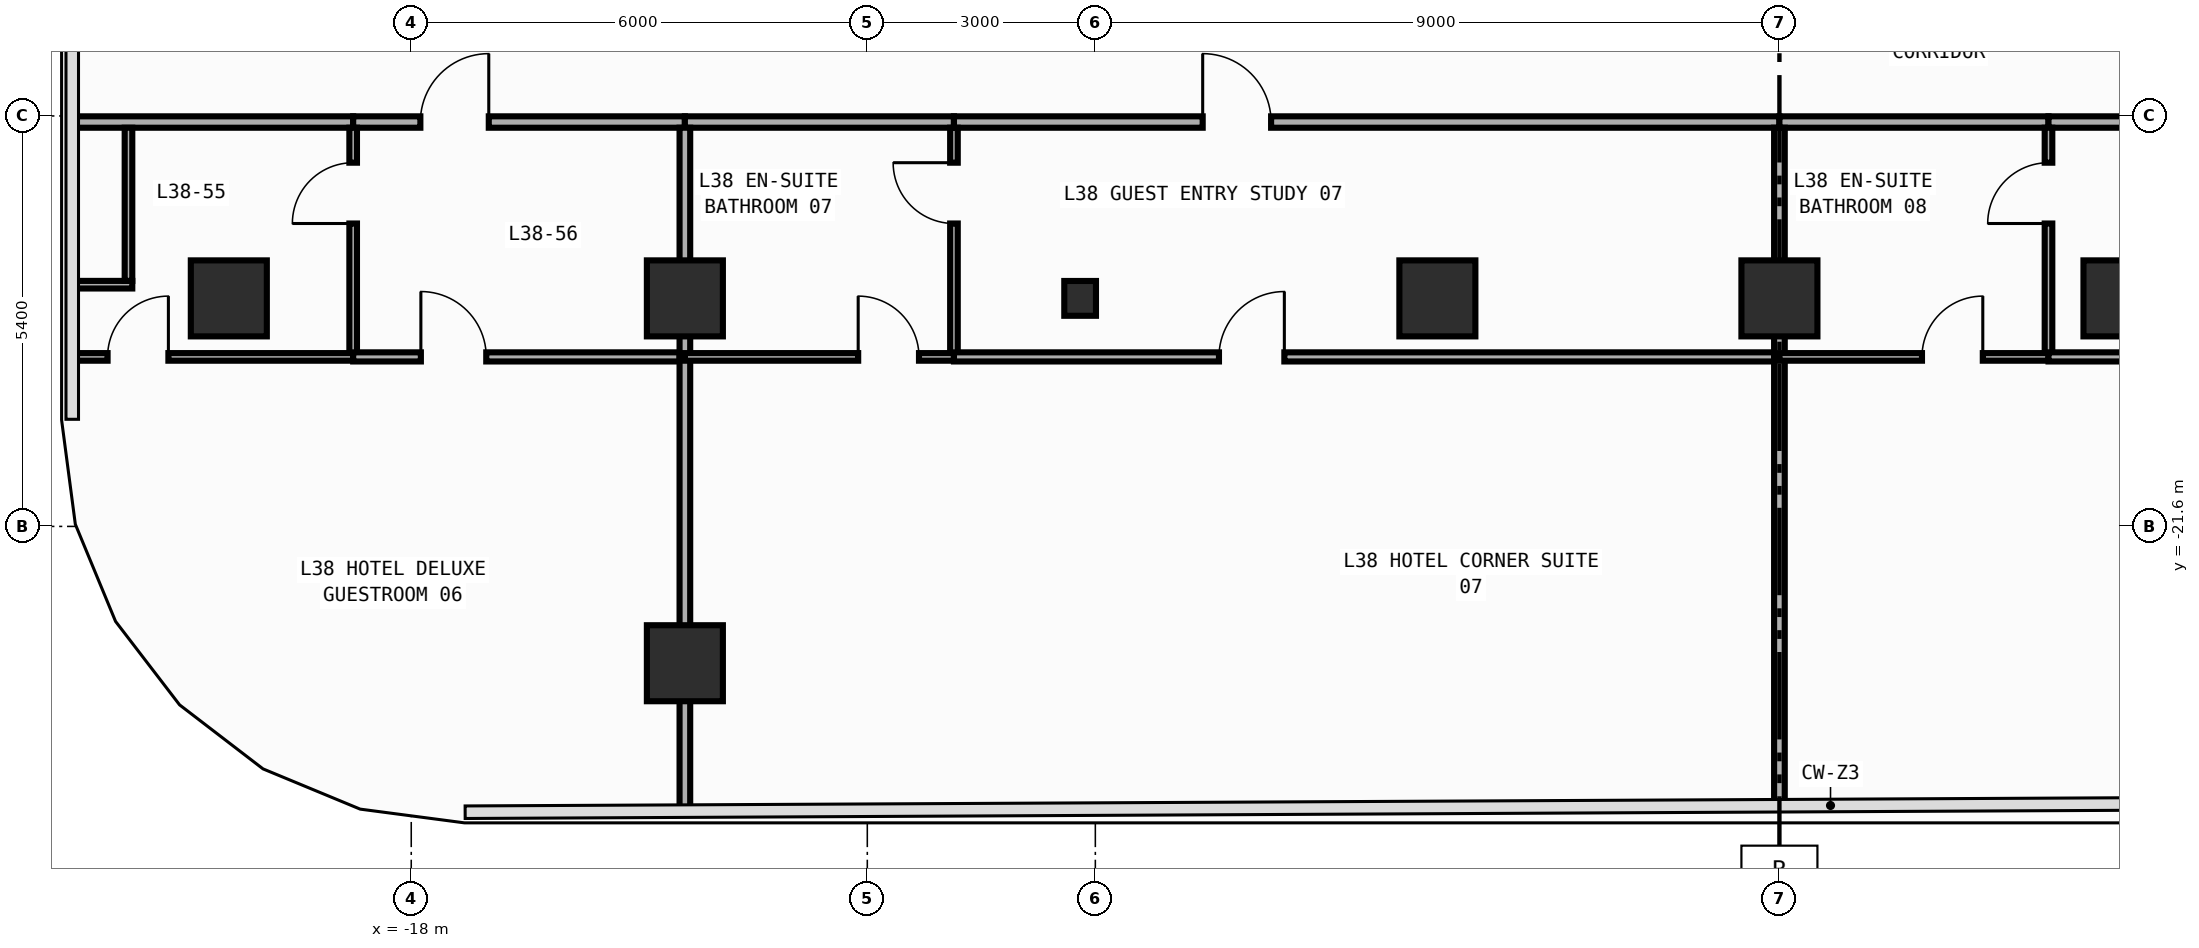
"""IFC4 building model, lengths in metres.
Left out: names, types, materials, properties, quantities, classifications, styles, units other than length and angle.
Written with IfcOpenShell. Run it as: python <this file> out.ifc"""

import sys

from ifc_helpers import new_model, si_unit, direction, frame, frame_2d, origin, origin_2d, place, context, subcontext, project, spatial, rectangle, i_section, extrude, element, fill, save


model = new_model("IFC4")
c1 = context("Model", 3, precision=1e-05, world=origin(), true_north=direction((0.0, 1.0)))
c2 = subcontext(c1, "Body", "Model", "MODEL_VIEW")
j1 = project(units=[si_unit("LENGTHUNIT", "METRE"), si_unit("PLANEANGLEUNIT", "RADIAN")], contexts=[c1])
p1 = place(None, origin())
s1 = spatial("IfcSite", under=j1, at=p1, CompositionType="ELEMENT")
p2 = place(p1, origin())
s2 = spatial("IfcBuilding", under=s1, at=p2, CompositionType="ELEMENT")
p3 = place(p2, frame((0.0, 0.0, 168.8)))
s3 = spatial("IfcBuildingStorey", under=s2, at=p3, CompositionType="ELEMENT", Elevation=168.8)
p4 = place(p3, frame((-9.2, -18.6, 0.0), z_axis=(0.0, 0.0, 1.0), x_axis=(1.0, 0.0, 0.0)))
e1 = element("IfcColumn", 1, at=p4, inside=s3, PredefinedType="COLUMN", context=c2, shape_type="SweptSolid", body=[
    extrude(i_section(OverallWidth=0.417, OverallDepth=0.458, WebThickness=0.03, FlangeThickness=0.05, FilletRadius=0.022, at=origin_2d()), origin(), (0.0, 0.0, 1.0), 3.8),
])
for number, where, z_axis, x_axis in (
    (2, (-20.4, -18.6, 0.0), (0.0, 0.0, 1.0), (1.0, 0.0, 0.0)),
    (3, (-14.4, -18.6, 0.0), (0.0, 0.0, 1.0), (1.0, 0.0, 0.0)),
    (4, (-4.5, -18.6, 0.0), (0.0, 0.0, 1.0), (1.0, 0.0, 0.0)),
    (5, (0.0, -18.6, 0.0), (0.0, 0.0, 1.0), (1.0, 0.0, 0.0)),
    (6, (4.5, -18.6, 0.0), (0.0, 0.0, 1.0), (1.0, 0.0, 0.0)),
    (7, (-14.4, -23.4, 0.0), (0.0, 0.0, 1.0), (1.0, 0.0, 0.0)),
):
    element("IfcColumn", number, at=place(p3, frame(where, z_axis=z_axis, x_axis=x_axis)), inside=s3, PredefinedType="COLUMN", context=c2, shape_type="SweptSolid", body=[
        extrude(rectangle(XDim=1.0, YDim=1.0, at=origin_2d()), origin(), (0.0, 0.0, 1.0), 3.8),
    ])
p5 = place(p3, frame((-22.455, -16.28, 0.0), z_axis=(0.0, 0.0, 1.0), x_axis=(1.0, 0.0, 0.0)))
e8 = element("IfcWall", 8, at=p5, inside=s3, PredefinedType="PARTITIONING", context=c2, shape_type="SweptSolid", body=[
    extrude(rectangle(XDim=3.691, YDim=0.15, at=frame_2d((1.846, 0.0))), origin(), (0.0, 0.0, 1.0), 3.54),
])
p6 = place(p3, frame((-18.764, -16.28, 0.0), z_axis=(0.0, 0.0, 1.0), x_axis=(1.0, 0.0, 0.0)))
e9 = element("IfcWall", 9, at=p6, inside=s3, PredefinedType="PARTITIONING", context=c2, shape_type="SweptSolid", body=[
    extrude(rectangle(XDim=4.364, YDim=0.15, at=frame_2d((2.182, 0.0))), origin(), (0.0, 0.0, 1.0), 3.54),
])
p7 = place(p6, frame((0.884, 0.0, 0.0)))
e10 = element("IfcOpeningElement", 10, at=p7, cuts=e9, PredefinedType="OPENING", context=c2, shape_type="SweptSolid", body=[
    extrude(rectangle(XDim=0.9, YDim=2.15, at=frame_2d((0.45, 1.075))), frame((0.0, 0.085, 0.0), z_axis=(0.0, -1.0, 0.0), x_axis=(1.0, 0.0, 0.0)), (0.0, 0.0, 1.0), 0.17),
])
p8 = place(p3, frame((-14.4, -16.28, 0.0), z_axis=(0.0, 0.0, 1.0), x_axis=(1.0, 0.0, 0.0)))
e11 = element("IfcWall", 11, at=p8, inside=s3, PredefinedType="PARTITIONING", context=c2, shape_type="SweptSolid", body=[
    extrude(rectangle(XDim=3.54, YDim=0.15, at=frame_2d((1.77, 0.0))), origin(), (0.0, 0.0, 1.0), 3.54),
])
p9 = place(p3, frame((-10.86, -16.28, 0.0), z_axis=(0.0, 0.0, 1.0), x_axis=(1.0, 0.0, 0.0)))
e12 = element("IfcWall", 12, at=p9, inside=s3, PredefinedType="PARTITIONING", context=c2, shape_type="SweptSolid", body=[
    extrude(rectangle(XDim=10.86, YDim=0.15, at=frame_2d((5.43, 0.0))), origin(), (0.0, 0.0, 1.0), 3.54),
])
p10 = place(p9, frame((3.272, 0.0, 0.0)))
e13 = element("IfcOpeningElement", 13, at=p10, cuts=e12, PredefinedType="OPENING", context=c2, shape_type="SweptSolid", body=[
    extrude(rectangle(XDim=0.9, YDim=2.15, at=frame_2d((0.45, 1.075))), frame((0.0, 0.085, 0.0), z_axis=(0.0, -1.0, 0.0), x_axis=(1.0, 0.0, 0.0)), (0.0, 0.0, 1.0), 0.17),
])
p11 = place(p3, frame((0.0, -16.28, 0.0), z_axis=(0.0, 0.0, 1.0), x_axis=(1.0, 0.0, 0.0)))
e14 = element("IfcWall", 14, at=p11, inside=s3, PredefinedType="PARTITIONING", context=c2, shape_type="SweptSolid", body=[
    extrude(rectangle(XDim=3.54, YDim=0.15, at=frame_2d((1.77, 0.0))), origin(), (0.0, 0.0, 1.0), 3.54),
])
p12 = place(p3, frame((3.54, -16.28, 0.0), z_axis=(0.0, 0.0, 1.0), x_axis=(1.0, 0.0, 0.0)))
e15 = element("IfcWall", 15, at=p12, inside=s3, PredefinedType="PARTITIONING", context=c2, shape_type="SweptSolid", body=[
    extrude(rectangle(XDim=8.7, YDim=0.15, at=frame_2d((4.35, 0.0))), origin(), (0.0, 0.0, 1.0), 3.54),
])
p13 = place(p12, frame((7.34, 0.0, 0.0)))
e16 = element("IfcOpeningElement", 16, at=p13, cuts=e15, PredefinedType="OPENING", context=c2, shape_type="SweptSolid", body=[
    extrude(rectangle(XDim=0.9, YDim=2.15, at=frame_2d((0.45, 1.075))), frame((0.0, 0.085, 0.0), z_axis=(0.0, -1.0, 0.0), x_axis=(1.0, 0.0, 0.0)), (0.0, 0.0, 1.0), 0.17),
])
p14 = place(p3, frame((-18.764, -19.32, 0.0), z_axis=(0.0, 0.0, 1.0), x_axis=(0.0, 1.0, 0.0)))
e17 = element("IfcWall", 17, at=p14, inside=s3, PredefinedType="PARTITIONING", context=c2, shape_type="SweptSolid", body=[
    extrude(rectangle(XDim=2.965, YDim=0.1, at=frame_2d((1.482, 0.0))), origin(), (0.0, 0.0, 1.0), 3.54),
])
p15 = place(p14, frame((1.705, 0.0, 0.0)))
e18 = element("IfcOpeningElement", 18, at=p15, cuts=e17, PredefinedType="OPENING", context=c2, shape_type="SweptSolid", body=[
    extrude(rectangle(XDim=0.8, YDim=2.1, at=frame_2d((0.4, 1.05))), frame((0.0, 0.06, 0.0), z_axis=(0.0, -1.0, 0.0), x_axis=(1.0, 0.0, 0.0)), (0.0, 0.0, 1.0), 0.12),
])
p16 = place(p3, frame((-22.455, -19.37, 0.0), z_axis=(0.0, 0.0, 1.0), x_axis=(1.0, 0.0, 0.0)))
e19 = element("IfcWall", 19, at=p16, inside=s3, PredefinedType="PARTITIONING", context=c2, shape_type="SweptSolid", body=[
    extrude(rectangle(XDim=3.691, YDim=0.1, at=frame_2d((1.846, 0.0))), origin(), (0.0, 0.0, 1.0), 3.54),
])
p17 = place(p16, frame((0.46, 0.0, 0.0)))
e20 = element("IfcOpeningElement", 20, at=p17, cuts=e19, PredefinedType="OPENING", context=c2, shape_type="SweptSolid", body=[
    extrude(rectangle(XDim=0.8, YDim=2.1, at=frame_2d((0.4, 1.05))), frame((0.0, 0.06, 0.0), z_axis=(0.0, -1.0, 0.0), x_axis=(1.0, 0.0, 0.0)), (0.0, 0.0, 1.0), 0.12),
])
p18 = place(p3, frame((-18.764, -19.37, 0.0), z_axis=(0.0, 0.0, 1.0), x_axis=(1.0, 0.0, 0.0)))
e21 = element("IfcWall", 21, at=p18, inside=s3, PredefinedType="PARTITIONING", context=c2, shape_type="SweptSolid", body=[
    extrude(rectangle(XDim=4.364, YDim=0.12, at=frame_2d((2.182, 0.0))), origin(), (0.0, 0.0, 1.0), 3.54),
])
p19 = place(p18, frame((0.891, 0.0, 0.0)))
e22 = element("IfcOpeningElement", 22, at=p19, cuts=e21, PredefinedType="OPENING", context=c2, shape_type="SweptSolid", body=[
    extrude(rectangle(XDim=0.86, YDim=2.15, at=frame_2d((0.43, 1.075))), frame((0.0, 0.07, 0.0), z_axis=(0.0, -1.0, 0.0), x_axis=(1.0, 0.0, 0.0)), (0.0, 0.0, 1.0), 0.14),
])
p20 = place(p3, frame((-14.4, -19.37, 0.0), z_axis=(0.0, 0.0, 1.0), x_axis=(0.0, 1.0, 0.0)))
e23 = element("IfcWall", 23, at=p20, inside=s3, PredefinedType="PARTITIONING", context=c2, shape_type="SweptSolid", body=[
    extrude(rectangle(XDim=3.015, YDim=0.14, at=frame_2d((1.508, 0.0))), origin(), (0.0, 0.0, 1.0), 2.952),
])
p21 = place(p3, frame((-14.4, -25.341, 0.0), z_axis=(0.0, 0.0, 1.0), x_axis=(0.0, 1.0, 0.0)))
e24 = element("IfcWall", 24, at=p21, inside=s3, PredefinedType="PARTITIONING", context=c2, shape_type="SweptSolid", body=[
    extrude(rectangle(XDim=5.971, YDim=0.14, at=frame_2d((2.985, 0.0))), origin(), (0.0, 0.0, 1.0), 2.952),
])
p22 = place(p3, frame((-10.86, -19.32, 0.0), z_axis=(0.0, 0.0, 1.0), x_axis=(0.0, 1.0, 0.0)))
e25 = element("IfcWall", 25, at=p22, inside=s3, PredefinedType="PARTITIONING", context=c2, shape_type="SweptSolid", body=[
    extrude(rectangle(XDim=2.965, YDim=0.1, at=frame_2d((1.482, 0.0))), origin(), (0.0, 0.0, 1.0), 3.54),
])
p23 = place(p22, frame((1.705, 0.0, 0.0)))
e26 = element("IfcOpeningElement", 26, at=p23, cuts=e25, PredefinedType="OPENING", context=c2, shape_type="SweptSolid", body=[
    extrude(rectangle(XDim=0.8, YDim=2.1, at=frame_2d((0.4, 1.05))), frame((0.0, 0.06, 0.0), z_axis=(0.0, -1.0, 0.0), x_axis=(1.0, 0.0, 0.0)), (0.0, 0.0, 1.0), 0.12),
])
p24 = place(p3, frame((-14.4, -19.37, 0.0), z_axis=(0.0, 0.0, 1.0), x_axis=(1.0, 0.0, 0.0)))
e27 = element("IfcWall", 27, at=p24, inside=s3, PredefinedType="PARTITIONING", context=c2, shape_type="SweptSolid", body=[
    extrude(rectangle(XDim=3.54, YDim=0.1, at=frame_2d((1.77, 0.0))), origin(), (0.0, 0.0, 1.0), 3.54),
])
p25 = place(p24, frame((2.28, 0.0, 0.0)))
e28 = element("IfcOpeningElement", 28, at=p25, cuts=e27, PredefinedType="OPENING", context=c2, shape_type="SweptSolid", body=[
    extrude(rectangle(XDim=0.8, YDim=2.1, at=frame_2d((0.4, 1.05))), frame((0.0, 0.06, 0.0), z_axis=(0.0, -1.0, 0.0), x_axis=(1.0, 0.0, 0.0)), (0.0, 0.0, 1.0), 0.12),
])
p26 = place(p3, frame((-10.86, -19.37, 0.0), z_axis=(0.0, 0.0, 1.0), x_axis=(1.0, 0.0, 0.0)))
e29 = element("IfcWall", 29, at=p26, inside=s3, PredefinedType="PARTITIONING", context=c2, shape_type="SweptSolid", body=[
    extrude(rectangle(XDim=10.86, YDim=0.12, at=frame_2d((5.43, 0.0))), origin(), (0.0, 0.0, 1.0), 3.54),
])
p27 = place(p26, frame((3.487, 0.0, 0.0)))
e30 = element("IfcOpeningElement", 30, at=p27, cuts=e29, PredefinedType="OPENING", context=c2, shape_type="SweptSolid", body=[
    extrude(rectangle(XDim=0.86, YDim=2.15, at=frame_2d((0.43, 1.075))), frame((0.0, 0.07, 0.0), z_axis=(0.0, -1.0, 0.0), x_axis=(1.0, 0.0, 0.0)), (0.0, 0.0, 1.0), 0.14),
])
p28 = place(p3, frame((0.0, -19.37, 0.0), z_axis=(0.0, 0.0, 1.0), x_axis=(0.0, 1.0, 0.0)))
e31 = element("IfcWall", 31, at=p28, inside=s3, PredefinedType="PARTITIONING", context=c2, shape_type="SweptSolid", body=[
    extrude(rectangle(XDim=3.015, YDim=0.14, at=frame_2d((1.508, 0.0))), origin(), (0.0, 0.0, 1.0), 3.54),
])
p29 = place(p3, frame((0.0, -25.27, 0.0), z_axis=(0.0, 0.0, 1.0), x_axis=(0.0, 1.0, 0.0)))
e32 = element("IfcWall", 32, at=p29, inside=s3, PredefinedType="PARTITIONING", context=c2, shape_type="SweptSolid", body=[
    extrude(rectangle(XDim=5.9, YDim=0.14, at=frame_2d((2.95, 0.0))), origin(), (0.0, 0.0, 1.0), 3.54),
])
p30 = place(p3, frame((3.54, -19.32, 0.0), z_axis=(0.0, 0.0, 1.0), x_axis=(0.0, 1.0, 0.0)))
e33 = element("IfcWall", 33, at=p30, inside=s3, PredefinedType="PARTITIONING", context=c2, shape_type="SweptSolid", body=[
    extrude(rectangle(XDim=2.965, YDim=0.1, at=frame_2d((1.482, 0.0))), origin(), (0.0, 0.0, 1.0), 3.54),
])
p31 = place(p30, frame((1.705, 0.0, 0.0)))
e34 = element("IfcOpeningElement", 34, at=p31, cuts=e33, PredefinedType="OPENING", context=c2, shape_type="SweptSolid", body=[
    extrude(rectangle(XDim=0.8, YDim=2.1, at=frame_2d((0.4, 1.05))), frame((0.0, 0.06, 0.0), z_axis=(0.0, -1.0, 0.0), x_axis=(1.0, 0.0, 0.0)), (0.0, 0.0, 1.0), 0.12),
])
p32 = place(p3, frame((0.0, -19.37, 0.0), z_axis=(0.0, 0.0, 1.0), x_axis=(1.0, 0.0, 0.0)))
e35 = element("IfcWall", 35, at=p32, inside=s3, PredefinedType="PARTITIONING", context=c2, shape_type="SweptSolid", body=[
    extrude(rectangle(XDim=3.54, YDim=0.1, at=frame_2d((1.77, 0.0))), origin(), (0.0, 0.0, 1.0), 3.54),
])
p33 = place(p32, frame((1.875, 0.0, 0.0)))
e36 = element("IfcOpeningElement", 36, at=p33, cuts=e35, PredefinedType="OPENING", context=c2, shape_type="SweptSolid", body=[
    extrude(rectangle(XDim=0.8, YDim=2.1, at=frame_2d((0.4, 1.05))), frame((0.0, 0.06, 0.0), z_axis=(0.0, -1.0, 0.0), x_axis=(1.0, 0.0, 0.0)), (0.0, 0.0, 1.0), 0.12),
])
p34 = place(p3, frame((3.54, -19.37, 0.0), z_axis=(0.0, 0.0, 1.0), x_axis=(1.0, 0.0, 0.0)))
e37 = element("IfcWall", 37, at=p34, inside=s3, PredefinedType="PARTITIONING", context=c2, shape_type="SweptSolid", body=[
    extrude(rectangle(XDim=8.7, YDim=0.12, at=frame_2d((4.35, 0.0))), origin(), (0.0, 0.0, 1.0), 3.54),
])
p35 = place(p34, frame((7.38, 0.0, 0.0)))
e38 = element("IfcOpeningElement", 38, at=p35, cuts=e37, PredefinedType="OPENING", context=c2, shape_type="SweptSolid", body=[
    extrude(rectangle(XDim=0.86, YDim=2.15, at=frame_2d((0.43, 1.075))), frame((0.0, 0.07, 0.0), z_axis=(0.0, -1.0, 0.0), x_axis=(1.0, 0.0, 0.0)), (0.0, 0.0, 1.0), 0.14),
])
p36 = place(p3, frame((-21.67, -18.42, 0.0), z_axis=(0.0, 0.0, 1.0), x_axis=(-1.0, 0.0, 0.0)))
e39 = element("IfcWall", 39, at=p36, inside=s3, PredefinedType="PARTITIONING", context=c2, shape_type="SweptSolid", body=[
    extrude(rectangle(XDim=0.785, YDim=0.1, at=frame_2d((0.393, 0.0))), origin(), (0.0, 0.0, 1.0), 3.54),
])
p37 = place(p3, frame((-21.72, -18.37, 0.0), z_axis=(0.0, 0.0, 1.0), x_axis=(0.0, 1.0, 0.0)))
e40 = element("IfcWall", 40, at=p37, inside=s3, PredefinedType="PARTITIONING", context=c2, shape_type="SweptSolid", body=[
    extrude(rectangle(XDim=2.015, YDim=0.1, at=frame_2d((1.008, 0.0))), origin(), (0.0, 0.0, 1.0), 3.54),
])
p38 = place(p7, origin())
e41 = element("IfcDoor", 41, at=p38, inside=s3, OperationType="SINGLE_SWING_RIGHT", PredefinedType="DOOR", context=c2, shape_type="SweptSolid", body=[
    extrude(rectangle(XDim=0.9, YDim=2.15, at=frame_2d((0.45, 1.075))), frame((0.0, 0.025, 0.0), z_axis=(0.0, -1.0, 0.0), x_axis=(1.0, 0.0, 0.0)), (0.0, 0.0, 1.0), 0.05),
])
fill(e10, e41)
p39 = place(p10, origin())
e42 = element("IfcDoor", 42, at=p39, inside=s3, OperationType="SINGLE_SWING_LEFT", PredefinedType="DOOR", context=c2, shape_type="SweptSolid", body=[
    extrude(rectangle(XDim=0.9, YDim=2.15, at=frame_2d((0.45, 1.075))), frame((0.0, 0.025, 0.0), z_axis=(0.0, -1.0, 0.0), x_axis=(1.0, 0.0, 0.0)), (0.0, 0.0, 1.0), 0.05),
])
fill(e13, e42)
p40 = place(p15, origin())
e43 = element("IfcDoor", 43, at=p40, inside=s3, OperationType="SINGLE_SWING_LEFT", PredefinedType="DOOR", context=c2, shape_type="SweptSolid", body=[
    extrude(rectangle(XDim=0.8, YDim=2.1, at=frame_2d((0.4, 1.05))), frame((0.0, 0.025, 0.0), z_axis=(0.0, -1.0, 0.0), x_axis=(1.0, 0.0, 0.0)), (0.0, 0.0, 1.0), 0.05),
])
fill(e18, e43)
p41 = place(p17, origin())
e44 = element("IfcDoor", 44, at=p41, inside=s3, OperationType="SINGLE_SWING_RIGHT", PredefinedType="DOOR", context=c2, shape_type="SweptSolid", body=[
    extrude(rectangle(XDim=0.8, YDim=2.1, at=frame_2d((0.4, 1.05))), frame((0.0, 0.025, 0.0), z_axis=(0.0, -1.0, 0.0), x_axis=(1.0, 0.0, 0.0)), (0.0, 0.0, 1.0), 0.05),
])
fill(e20, e44)
p42 = place(p19, origin())
e45 = element("IfcDoor", 45, at=p42, inside=s3, OperationType="SINGLE_SWING_LEFT", PredefinedType="DOOR", context=c2, shape_type="SweptSolid", body=[
    extrude(rectangle(XDim=0.86, YDim=2.15, at=frame_2d((0.43, 1.075))), frame((0.0, 0.025, 0.0), z_axis=(0.0, -1.0, 0.0), x_axis=(1.0, 0.0, 0.0)), (0.0, 0.0, 1.0), 0.05),
])
fill(e22, e45)
p43 = place(p23, origin())
e46 = element("IfcDoor", 46, at=p43, inside=s3, OperationType="SINGLE_SWING_RIGHT", PredefinedType="DOOR", context=c2, shape_type="SweptSolid", body=[
    extrude(rectangle(XDim=0.8, YDim=2.1, at=frame_2d((0.4, 1.05))), frame((0.0, 0.025, 0.0), z_axis=(0.0, -1.0, 0.0), x_axis=(1.0, 0.0, 0.0)), (0.0, 0.0, 1.0), 0.05),
])
fill(e26, e46)
p44 = place(p25, origin())
e47 = element("IfcDoor", 47, at=p44, inside=s3, OperationType="SINGLE_SWING_LEFT", PredefinedType="DOOR", context=c2, shape_type="SweptSolid", body=[
    extrude(rectangle(XDim=0.8, YDim=2.1, at=frame_2d((0.4, 1.05))), frame((0.0, 0.025, 0.0), z_axis=(0.0, -1.0, 0.0), x_axis=(1.0, 0.0, 0.0)), (0.0, 0.0, 1.0), 0.05),
])
fill(e28, e47)
p45 = place(p27, origin())
e48 = element("IfcDoor", 48, at=p45, inside=s3, OperationType="SINGLE_SWING_RIGHT", PredefinedType="DOOR", context=c2, shape_type="SweptSolid", body=[
    extrude(rectangle(XDim=0.86, YDim=2.15, at=frame_2d((0.43, 1.075))), frame((0.0, 0.025, 0.0), z_axis=(0.0, -1.0, 0.0), x_axis=(1.0, 0.0, 0.0)), (0.0, 0.0, 1.0), 0.05),
])
fill(e30, e48)
p46 = place(p31, origin())
e49 = element("IfcDoor", 49, at=p46, inside=s3, OperationType="SINGLE_SWING_LEFT", PredefinedType="DOOR", context=c2, shape_type="SweptSolid", body=[
    extrude(rectangle(XDim=0.8, YDim=2.1, at=frame_2d((0.4, 1.05))), frame((0.0, 0.025, 0.0), z_axis=(0.0, -1.0, 0.0), x_axis=(1.0, 0.0, 0.0)), (0.0, 0.0, 1.0), 0.05),
])
fill(e34, e49)
p47 = place(p33, origin())
e50 = element("IfcDoor", 50, at=p47, inside=s3, OperationType="SINGLE_SWING_RIGHT", PredefinedType="DOOR", context=c2, shape_type="SweptSolid", body=[
    extrude(rectangle(XDim=0.8, YDim=2.1, at=frame_2d((0.4, 1.05))), frame((0.0, 0.025, 0.0), z_axis=(0.0, -1.0, 0.0), x_axis=(1.0, 0.0, 0.0)), (0.0, 0.0, 1.0), 0.05),
])
fill(e36, e50)
save(model, sys.argv[1])
